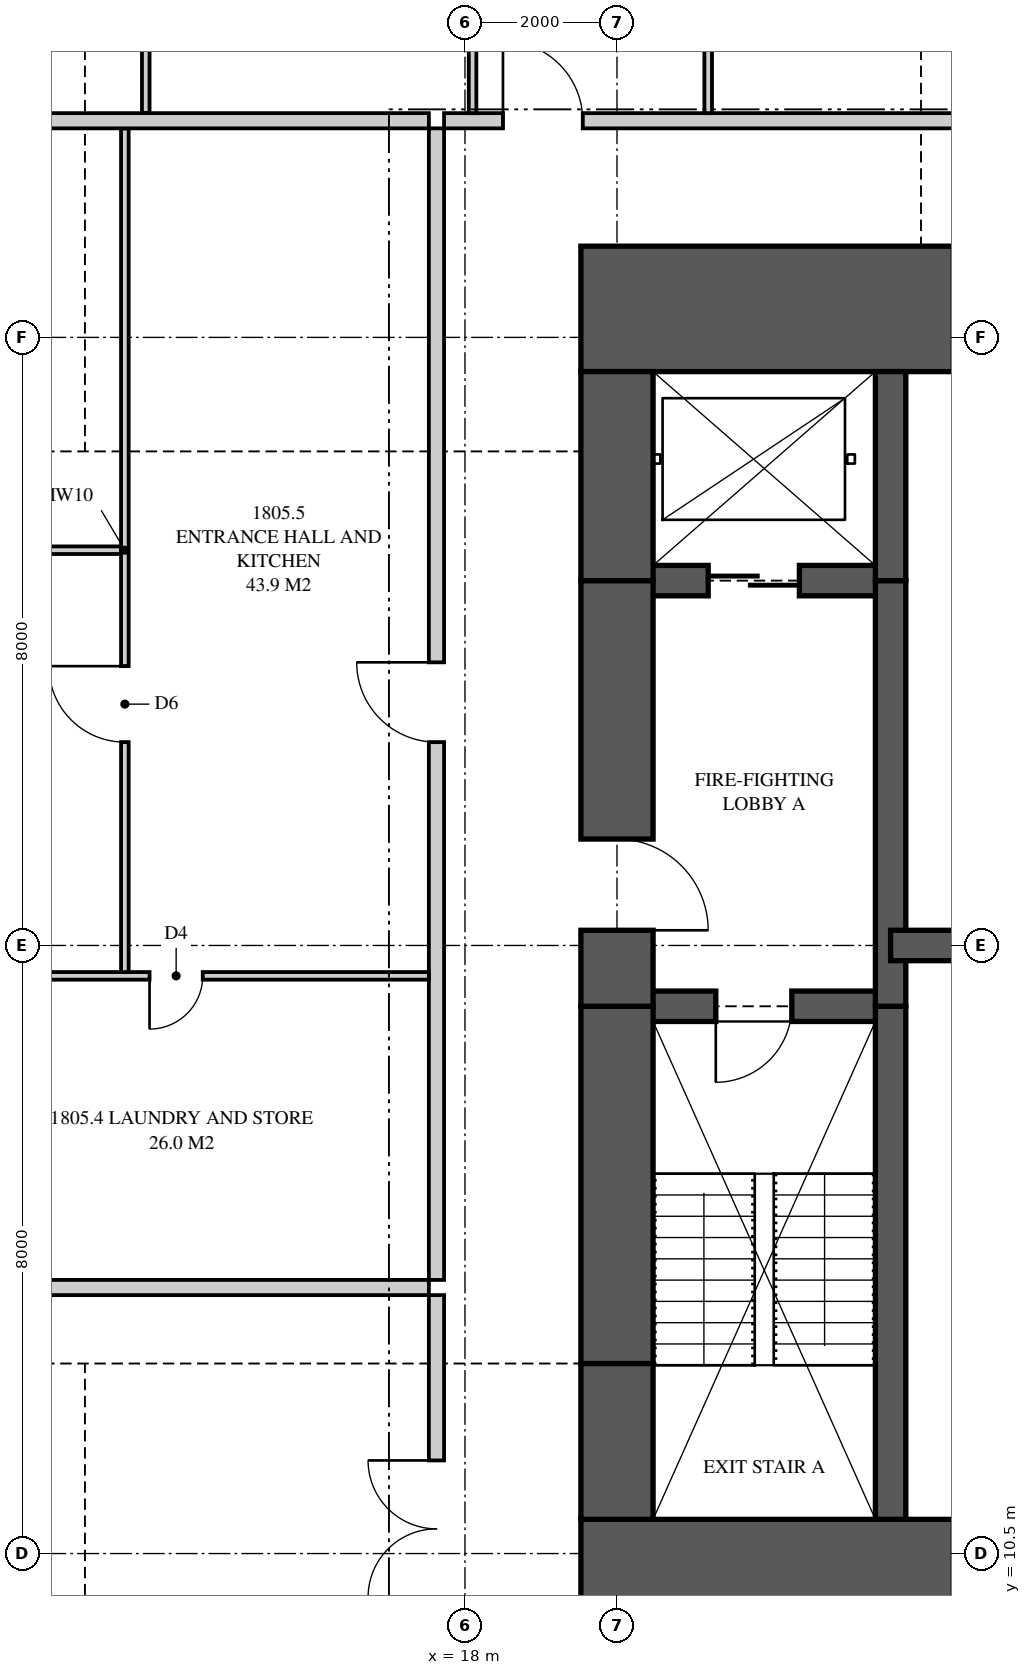
"""IFC4 building model, lengths in metres.
Left out: names, types, materials, properties, quantities, classifications, styles, units other than length and angle.
Written with IfcOpenShell. Run it as: python <this file> out.ifc"""

import sys

from ifc_helpers import new_model, si_unit, direction, frame, frame_2d, origin, place, context, subcontext, project, spatial, polyline, rectangle, outline, extrude, element, fill, save


model = new_model("IFC4")
c1 = context("Model", 3, precision=1e-05, world=origin(), true_north=direction((0.0, 1.0)))
c2 = subcontext(c1, "Body", "Model", "MODEL_VIEW")
j1 = project(units=[si_unit("LENGTHUNIT", "METRE"), si_unit("PLANEANGLEUNIT", "RADIAN")], contexts=[c1])
p1 = place(None, origin())
s1 = spatial("IfcSite", under=j1, at=p1, CompositionType="ELEMENT")
p2 = place(p1, origin())
s2 = spatial("IfcBuilding", under=s1, at=p2, CompositionType="ELEMENT")
p3 = place(p2, frame((0.0, 0.0, 67.9)))
s3 = spatial("IfcBuildingStorey", under=s2, at=p3, CompositionType="ELEMENT", Elevation=67.9)
p4 = place(p3, frame((19.525, 10.125, 0.0), z_axis=(0.0, 0.0, 1.0), x_axis=(1.0, 0.0, 0.0)))
e1 = element("IfcWall", 1, at=p4, inside=s3, PredefinedType="SHEAR", context=c2, shape_type="SweptSolid", body=[
    extrude(rectangle(XDim=6.475, YDim=1.65, at=frame_2d((3.238, 0.0))), origin(), (0.0, 0.0, 1.0), 3.35),
])
p5 = place(p4, frame((4.9, 0.0, 0.0)))
e2 = element("IfcOpeningElement", 2, at=p5, cuts=e1, PredefinedType="OPENING", context=c2, shape_type="SweptSolid", body=[
    extrude(rectangle(XDim=0.75, YDim=2.1, at=frame_2d((0.375, 1.05))), frame((0.0, 0.835, 0.0), z_axis=(0.0, -1.0, 0.0), x_axis=(1.0, 0.0, 0.0)), (0.0, 0.0, 1.0), 1.67),
])
p6 = place(p3, frame((26.0, 26.875, 0.0), z_axis=(0.0, 0.0, 1.0), x_axis=(-1.0, 0.0, 0.0)))
e3 = element("IfcWall", 3, at=p6, inside=s3, PredefinedType="SHEAR", context=c2, shape_type="SweptSolid", body=[
    extrude(rectangle(XDim=6.475, YDim=1.65, at=frame_2d((3.238, 0.0))), origin(), (0.0, 0.0, 1.0), 3.35),
])
p7 = place(p6, frame((0.825, 0.0, 0.0)))
e4 = element("IfcOpeningElement", 4, at=p7, cuts=e3, PredefinedType="OPENING", context=c2, shape_type="SweptSolid", body=[
    extrude(rectangle(XDim=0.75, YDim=2.1, at=frame_2d((0.375, 1.05))), frame((0.0, 0.835, 0.0), z_axis=(0.0, -1.0, 0.0), x_axis=(1.0, 0.0, 0.0)), (0.0, 0.0, 1.0), 1.67),
])
p8 = place(p3, frame((20.0, 26.05, 0.0), z_axis=(0.0, 0.0, 1.0), x_axis=(0.0, -1.0, 0.0)))
e5 = element("IfcWall", 5, at=p8, inside=s3, PredefinedType="SHEAR", context=c2, shape_type="SweptSolid", body=[
    extrude(rectangle(XDim=2.75, YDim=0.95, at=frame_2d((1.375, 0.0))), origin(), (0.0, 0.0, 1.0), 3.35),
])
p9 = place(p3, frame((20.0, 23.3, 0.0), z_axis=(0.0, 0.0, 1.0), x_axis=(0.0, -1.0, 0.0)))
e6 = element("IfcWall", 6, at=p9, inside=s3, PredefinedType="SHEAR", context=c2, shape_type="SweptSolid", body=[
    extrude(rectangle(XDim=5.6, YDim=0.95, at=frame_2d((2.8, 0.0))), origin(), (0.0, 0.0, 1.0), 3.35),
])
p10 = place(p9, frame((3.4, 0.0, 0.0)))
e7 = element("IfcOpeningElement", 7, at=p10, cuts=e6, PredefinedType="OPENING", context=c2, shape_type="SweptSolid", body=[
    extrude(rectangle(XDim=1.2, YDim=2.2, at=frame_2d((0.6, 1.1))), frame((0.0, 0.485, 0.0), z_axis=(0.0, -1.0, 0.0), x_axis=(1.0, 0.0, 0.0)), (0.0, 0.0, 1.0), 0.97),
])
p11 = place(p3, frame((20.0, 17.7, 0.0), z_axis=(0.0, 0.0, 1.0), x_axis=(0.0, -1.0, 0.0)))
e8 = element("IfcWall", 8, at=p11, inside=s3, PredefinedType="SHEAR", context=c2, shape_type="SweptSolid", body=[
    extrude(rectangle(XDim=4.7, YDim=0.95, at=frame_2d((2.35, 0.0))), origin(), (0.0, 0.0, 1.0), 3.35),
])
p12 = place(p3, frame((20.0, 13.0, 0.0), z_axis=(0.0, 0.0, 1.0), x_axis=(0.0, -1.0, 0.0)))
e9 = element("IfcWall", 9, at=p12, inside=s3, PredefinedType="SHEAR", context=c2, shape_type="SweptSolid", body=[
    extrude(rectangle(XDim=2.05, YDim=0.95, at=frame_2d((1.025, 0.0))), origin(), (0.0, 0.0, 1.0), 3.35),
])
p13 = place(p3, frame((23.6, 10.95, 0.0), z_axis=(0.0, 0.0, 1.0), x_axis=(0.0, 1.0, 0.0)))
e10 = element("IfcWall", 10, at=p13, inside=s3, PredefinedType="SHEAR", context=c2, shape_type="SweptSolid", body=[
    extrude(rectangle(XDim=6.75, YDim=0.4, at=frame_2d((3.375, 0.0))), origin(), (0.0, 0.0, 1.0), 3.35),
])
p14 = place(p3, frame((23.6, 17.7, 0.0), z_axis=(0.0, 0.0, 1.0), x_axis=(0.0, 1.0, 0.0)))
e11 = element("IfcWall", 11, at=p14, inside=s3, PredefinedType="SHEAR", context=c2, shape_type="SweptSolid", body=[
    extrude(rectangle(XDim=5.6, YDim=0.4, at=frame_2d((2.8, 0.0))), origin(), (0.0, 0.0, 1.0), 3.35),
])
p15 = place(p3, frame((23.6, 23.3, 0.0), z_axis=(0.0, 0.0, 1.0), x_axis=(0.0, 1.0, 0.0)))
e12 = element("IfcWall", 12, at=p15, inside=s3, PredefinedType="SHEAR", context=c2, shape_type="SweptSolid", body=[
    extrude(rectangle(XDim=2.75, YDim=0.4, at=frame_2d((1.375, 0.0))), origin(), (0.0, 0.0, 1.0), 3.35),
])
p16 = place(p3, frame((20.0, 17.7, 0.0), z_axis=(0.0, 0.0, 1.0), x_axis=(1.0, 0.0, 0.0)))
e13 = element("IfcWall", 13, at=p16, inside=s3, PredefinedType="SHEAR", context=c2, shape_type="SweptSolid", body=[
    extrude(rectangle(XDim=3.6, YDim=0.4, at=frame_2d((1.8, 0.0))), origin(), (0.0, 0.0, 1.0), 3.35),
])
p17 = place(p16, frame((1.3, 0.0, 0.0)))
e14 = element("IfcOpeningElement", 14, at=p17, cuts=e13, PredefinedType="OPENING", context=c2, shape_type="SweptSolid", body=[
    extrude(rectangle(XDim=1.0, YDim=2.1, at=frame_2d((0.5, 1.05))), frame((0.0, 0.21, 0.0), z_axis=(0.0, -1.0, 0.0), x_axis=(1.0, 0.0, 0.0)), (0.0, 0.0, 1.0), 0.42),
])
p18 = place(p3, frame((20.0, 23.3, 0.0), z_axis=(0.0, 0.0, 1.0), x_axis=(1.0, 0.0, 0.0)))
e15 = element("IfcWall", 15, at=p18, inside=s3, PredefinedType="SHEAR", context=c2, shape_type="SweptSolid", body=[
    extrude(rectangle(XDim=3.6, YDim=0.4, at=frame_2d((1.8, 0.0))), origin(), (0.0, 0.0, 1.0), 3.35),
])
p19 = place(p18, frame((1.2, 0.0, 0.0)))
e16 = element("IfcOpeningElement", 16, at=p19, cuts=e15, PredefinedType="OPENING", context=c2, shape_type="SweptSolid", body=[
    extrude(rectangle(XDim=1.2, YDim=2.1, at=frame_2d((0.6, 1.05))), frame((0.0, 0.21, 0.0), z_axis=(0.0, -1.0, 0.0), x_axis=(1.0, 0.0, 0.0)), (0.0, 0.0, 1.0), 0.42),
])
p20 = place(p3, frame((23.6, 18.5, 0.0), z_axis=(0.0, 0.0, 1.0), x_axis=(1.0, 0.0, 0.0)))
e17 = element("IfcWall", 17, at=p20, inside=s3, PredefinedType="SHEAR", context=c2, shape_type="SweptSolid", body=[
    extrude(rectangle(XDim=2.4, YDim=0.4, at=frame_2d((1.2, 0.0))), origin(), (0.0, 0.0, 1.0), 3.35),
])
p21 = place(p3, frame((17.725, 29.35, 0.0), z_axis=(0.0, 0.0, 1.0), x_axis=(1.0, 0.0, 0.0)))
e18 = element("IfcWall", 18, at=p21, inside=s3, PredefinedType="PARTITIONING", context=c2, shape_type="SweptSolid", body=[
    extrude(outline(polyline([(0.0, 0.0), (7.075, 0.0), (7.075, 3.11), (6.612, 3.11), (6.612, 2.541), (5.938, 2.541), (5.938, 3.11), (0.0, 3.11), (0.0, 0.0)])), frame((0.0, 0.1, 0.0), z_axis=(0.0, -1.0, 0.0), x_axis=(1.0, 0.0, 0.0)), (0.0, 0.0, 1.0), 0.2),
])
p22 = place(p21, frame((0.775, 0.0, 0.0)))
e19 = element("IfcOpeningElement", 19, at=p22, cuts=e18, PredefinedType="OPENING", context=c2, shape_type="SweptSolid", body=[
    extrude(rectangle(XDim=1.05, YDim=2.2, at=frame_2d((0.525, 1.1))), frame((0.0, 0.11, 0.0), z_axis=(0.0, -1.0, 0.0), x_axis=(1.0, 0.0, 0.0)), (0.0, 0.0, 1.0), 0.22),
])
p23 = place(p3, frame((13.8, 37.825, 0.0), z_axis=(0.0, 0.0, 1.0), x_axis=(0.0, -1.0, 0.0)))
e20 = element("IfcWall", 20, at=p23, inside=s3, PredefinedType="PARTITIONING", context=c2, shape_type="SweptSolid", body=[
    extrude(outline(polyline([(2.035, 2.15), (0.0, 2.15), (0.0, 0.0), (8.375, 0.0), (8.375, 3.11), (2.035, 3.11), (2.035, 2.15)]), holes=[polyline([(1.021, 0.133), (0.529, 0.133), (0.529, 0.923), (1.021, 0.923), (1.021, 0.133)]), polyline([(1.021, 1.227), (0.529, 1.227), (0.529, 2.017), (1.021, 2.017), (1.021, 1.227)])]), frame((0.0, 0.05, 0.0), z_axis=(0.0, -1.0, 0.0), x_axis=(1.0, 0.0, 0.0)), (0.0, 0.0, 1.0), 0.1),
])
p24 = place(p23, frame((4.525, 0.0, 0.0)))
e21 = element("IfcOpeningElement", 21, at=p24, cuts=e20, PredefinedType="OPENING", context=c2, shape_type="SweptSolid", body=[
    extrude(rectangle(XDim=0.9, YDim=2.1, at=frame_2d((0.45, 1.05))), frame((0.0, 0.06, 0.0), z_axis=(0.0, -1.0, 0.0), x_axis=(1.0, 0.0, 0.0)), (0.0, 0.0, 1.0), 0.12),
])
p25 = place(p3, frame((18.1, 37.825, 0.0), z_axis=(0.0, 0.0, 1.0), x_axis=(0.0, -1.0, 0.0)))
e22 = element("IfcWall", 22, at=p25, inside=s3, PredefinedType="PARTITIONING", context=c2, shape_type="SweptSolid", body=[
    extrude(outline(polyline([(0.0, 0.0), (8.375, 0.0), (8.375, 3.11), (2.035, 3.11), (2.035, 2.15), (0.0, 2.15), (0.0, 3.11), (0.0, 0.0)])), frame((0.0, 0.05, 0.0), z_axis=(0.0, -1.0, 0.0), x_axis=(1.0, 0.0, 0.0)), (0.0, 0.0, 1.0), 0.1),
])
p26 = place(p25, frame((4.525, 0.0, 0.0)))
e23 = element("IfcOpeningElement", 23, at=p26, cuts=e22, PredefinedType="OPENING", context=c2, shape_type="SweptSolid", body=[
    extrude(rectangle(XDim=0.9, YDim=2.1, at=frame_2d((0.45, 1.05))), frame((0.0, 0.06, 0.0), z_axis=(0.0, -1.0, 0.0), x_axis=(1.0, 0.0, 0.0)), (0.0, 0.0, 1.0), 0.12),
])
p27 = place(p25, frame((5.95, 0.0, 0.0)))
e24 = element("IfcOpeningElement", 24, at=p27, cuts=e22, PredefinedType="OPENING", context=c2, shape_type="SweptSolid", body=[
    extrude(rectangle(XDim=0.9, YDim=2.1, at=frame_2d((0.45, 1.05))), frame((0.0, 0.06, 0.0), z_axis=(0.0, -1.0, 0.0), x_axis=(1.0, 0.0, 0.0)), (0.0, 0.0, 1.0), 0.12),
])
p28 = place(p3, frame((21.2, 32.4, 0.0), z_axis=(0.0, 0.0, 1.0), x_axis=(0.0, -1.0, 0.0)))
e25 = element("IfcWall", 25, at=p28, inside=s3, PredefinedType="PARTITIONING", context=c2, shape_type="SweptSolid", body=[
    extrude(rectangle(XDim=2.95, YDim=0.1, at=frame_2d((1.475, 0.0))), origin(), (0.0, 0.0, 1.0), 3.11),
])
p29 = place(p3, frame((2.0, 29.35, 0.0), z_axis=(0.0, 0.0, 1.0), x_axis=(1.0, 0.0, 0.0)))
e26 = element("IfcWall", 26, at=p29, inside=s3, PredefinedType="PARTITIONING", context=c2, shape_type="SweptSolid", body=[
    extrude(outline(polyline([(0.0, 0.0), (15.525, 0.0), (15.525, 3.11), (11.337, 3.11), (11.337, 2.541), (10.663, 2.541), (10.663, 3.11), (9.51, 3.11), (9.51, 2.51), (6.89, 2.51), (6.89, 3.11), (2.982, 3.11), (2.982, 2.15), (0.328, 2.15), (0.328, 3.11), (0.0, 3.11), (0.0, 0.0)])), frame((0.0, 0.1, 0.0), z_axis=(0.0, -1.0, 0.0), x_axis=(1.0, 0.0, 0.0)), (0.0, 0.0, 1.0), 0.2),
])
p30 = place(p3, frame((2.175, 14.0, 0.0), z_axis=(0.0, 0.0, 1.0), x_axis=(1.0, 0.0, 0.0)))
e27 = element("IfcWall", 27, at=p30, inside=s3, PredefinedType="PARTITIONING", context=c2, shape_type="SweptSolid", body=[
    extrude(outline(polyline([(0.529, 2.15), (0.0, 2.15), (0.0, 0.0), (0.529, 0.0), (0.529, 0.821), (1.021, 0.821), (1.021, 0.0), (15.35, 0.0), (15.35, 3.11), (9.335, 3.11), (9.335, 2.51), (6.715, 2.51), (6.715, 3.11), (2.085, 3.11), (2.085, 2.15), (1.021, 2.15), (1.021, 1.33), (0.529, 1.33), (0.529, 2.15)])), frame((0.0, 0.1, 0.0), z_axis=(0.0, -1.0, 0.0), x_axis=(1.0, 0.0, 0.0)), (0.0, 0.0, 1.0), 0.2),
])
p31 = place(p3, frame((17.625, 7.75, 0.0), z_axis=(0.0, 0.0, 1.0), x_axis=(0.0, 1.0, 0.0)))
e28 = element("IfcWall", 28, at=p31, inside=s3, PredefinedType="PARTITIONING", context=c2, shape_type="SweptSolid", body=[
    extrude(outline(polyline([(0.0, 0.0), (6.15, 0.0), (6.15, 3.11), (5.587, 3.11), (5.587, 2.541), (4.913, 2.541), (4.913, 3.11), (0.0, 3.11), (0.0, 0.0)])), frame((0.0, 0.1, 0.0), z_axis=(0.0, -1.0, 0.0), x_axis=(1.0, 0.0, 0.0)), (0.0, 0.0, 1.0), 0.2),
])
p32 = place(p31, frame((2.175, 0.0, 0.0)))
e29 = element("IfcOpeningElement", 29, at=p32, cuts=e28, PredefinedType="OPENING", context=c2, shape_type="SweptSolid", body=[
    extrude(rectangle(XDim=1.8, YDim=2.1, at=frame_2d((0.9, 1.05))), frame((0.0, 0.11, 0.0), z_axis=(0.0, -1.0, 0.0), x_axis=(1.0, 0.0, 0.0)), (0.0, 0.0, 1.0), 0.22),
])
p33 = place(p3, frame((17.625, 14.1, 0.0), z_axis=(0.0, 0.0, 1.0), x_axis=(0.0, 1.0, 0.0)))
e30 = element("IfcWall", 30, at=p33, inside=s3, PredefinedType="PARTITIONING", context=c2, shape_type="SweptSolid", body=[
    extrude(outline(polyline([(0.0, 0.0), (15.15, 0.0), (15.15, 3.11), (11.237, 3.11), (11.237, 2.541), (10.562, 2.541), (10.562, 3.11), (0.0, 3.11), (0.0, 0.0)])), frame((0.0, 0.1, 0.0), z_axis=(0.0, -1.0, 0.0), x_axis=(1.0, 0.0, 0.0)), (0.0, 0.0, 1.0), 0.2),
])
p34 = place(p33, frame((7.075, 0.0, 0.0)))
e31 = element("IfcOpeningElement", 31, at=p34, cuts=e30, PredefinedType="OPENING", context=c2, shape_type="SweptSolid", body=[
    extrude(rectangle(XDim=1.05, YDim=2.2, at=frame_2d((0.525, 1.1))), frame((0.0, 0.11, 0.0), z_axis=(0.0, -1.0, 0.0), x_axis=(1.0, 0.0, 0.0)), (0.0, 0.0, 1.0), 0.22),
])
p35 = place(p3, frame((2.175, 18.1, 0.0), z_axis=(0.0, 0.0, 1.0), x_axis=(1.0, 0.0, 0.0)))
e32 = element("IfcWall", 32, at=p35, inside=s3, PredefinedType="PARTITIONING", context=c2, shape_type="SweptSolid", body=[
    extrude(outline(polyline([(0.0, 0.0), (15.35, 0.0), (15.35, 3.11), (9.285, 3.11), (9.285, 2.51), (6.765, 2.51), (6.765, 3.11), (2.035, 3.11), (2.035, 2.15), (0.0, 2.15), (0.0, 3.11), (0.0, 0.0)])), frame((0.0, 0.05, 0.0), z_axis=(0.0, -1.0, 0.0), x_axis=(1.0, 0.0, 0.0)), (0.0, 0.0, 1.0), 0.1),
])
p36 = place(p35, frame((4.85, 0.0, 0.0)))
e33 = element("IfcOpeningElement", 33, at=p36, cuts=e32, PredefinedType="OPENING", context=c2, shape_type="SweptSolid", body=[
    extrude(rectangle(XDim=0.9, YDim=2.1, at=frame_2d((0.45, 1.05))), frame((0.0, 0.06, 0.0), z_axis=(0.0, -1.0, 0.0), x_axis=(1.0, 0.0, 0.0)), (0.0, 0.0, 1.0), 0.12),
])
p37 = place(p35, frame((11.675, 0.0, 0.0)))
e34 = element("IfcOpeningElement", 34, at=p37, cuts=e32, PredefinedType="OPENING", context=c2, shape_type="SweptSolid", body=[
    extrude(rectangle(XDim=0.7, YDim=2.1, at=frame_2d((0.35, 1.05))), frame((0.0, 0.06, 0.0), z_axis=(0.0, -1.0, 0.0), x_axis=(1.0, 0.0, 0.0)), (0.0, 0.0, 1.0), 0.12),
])
p38 = place(p3, frame((13.525, 18.15, 0.0), z_axis=(0.0, 0.0, 1.0), x_axis=(0.0, 1.0, 0.0)))
e35 = element("IfcWall", 35, at=p38, inside=s3, PredefinedType="PARTITIONING", context=c2, shape_type="SweptSolid", body=[
    extrude(outline(polyline([(0.0, 0.0), (11.1, 0.0), (11.1, 3.11), (7.137, 3.11), (7.137, 2.541), (6.563, 2.541), (6.563, 3.11), (0.0, 3.11), (0.0, 0.0)])), frame((0.0, 0.05, 0.0), z_axis=(0.0, -1.0, 0.0), x_axis=(1.0, 0.0, 0.0)), (0.0, 0.0, 1.0), 0.1),
])
p39 = place(p38, frame((3.025, 0.0, 0.0)))
e36 = element("IfcOpeningElement", 36, at=p39, cuts=e35, PredefinedType="OPENING", context=c2, shape_type="SweptSolid", body=[
    extrude(rectangle(XDim=1.0, YDim=2.1, at=frame_2d((0.5, 1.05))), frame((0.0, 0.06, 0.0), z_axis=(0.0, -1.0, 0.0), x_axis=(1.0, 0.0, 0.0)), (0.0, 0.0, 1.0), 0.12),
])
p40 = place(p3, frame((2.175, 23.7, 0.0), z_axis=(0.0, 0.0, 1.0), x_axis=(1.0, 0.0, 0.0)))
e37 = element("IfcWall", 37, at=p40, inside=s3, PredefinedType="PARTITIONING", context=c2, shape_type="SweptSolid", body=[
    extrude(outline(polyline([(0.529, 2.15), (0.0, 2.15), (0.0, 0.0), (0.529, 0.0), (0.529, 0.581), (1.021, 0.581), (1.021, 0.0), (11.3, 0.0), (11.3, 3.11), (9.285, 3.11), (9.285, 2.51), (6.765, 2.51), (6.765, 3.11), (2.035, 3.11), (2.035, 2.15), (1.021, 2.15), (1.021, 1.569), (0.529, 1.569), (0.529, 2.15)])), frame((0.0, 0.05, 0.0), z_axis=(0.0, -1.0, 0.0), x_axis=(1.0, 0.0, 0.0)), (0.0, 0.0, 1.0), 0.1),
])
p41 = place(p40, frame((5.15, 0.0, 0.0)))
e38 = element("IfcOpeningElement", 38, at=p41, cuts=e37, PredefinedType="OPENING", context=c2, shape_type="SweptSolid", body=[
    extrude(rectangle(XDim=1.0, YDim=2.1, at=frame_2d((0.5, 1.05))), frame((0.0, 0.06, 0.0), z_axis=(0.0, -1.0, 0.0), x_axis=(1.0, 0.0, 0.0)), (0.0, 0.0, 1.0), 0.12),
])
p42 = place(p22, origin())
e39 = element("IfcDoor", 39, at=p42, inside=s3, OperationType="SINGLE_SWING_LEFT", PredefinedType="DOOR", context=c2, shape_type="SweptSolid", body=[
    extrude(rectangle(XDim=1.05, YDim=2.2, at=frame_2d((0.525, 1.1))), frame((0.0, 0.025, 0.0), z_axis=(0.0, -1.0, 0.0), x_axis=(1.0, 0.0, 0.0)), (0.0, 0.0, 1.0), 0.05),
])
fill(e19, e39)
p43 = place(p32, origin())
e40 = element("IfcDoor", 40, at=p43, inside=s3, OperationType="DOUBLE_DOOR_SINGLE_SWING", PredefinedType="DOOR", context=c2, shape_type="SweptSolid", body=[
    extrude(rectangle(XDim=1.8, YDim=2.1, at=frame_2d((0.9, 1.05))), frame((0.0, 0.025, 0.0), z_axis=(0.0, -1.0, 0.0), x_axis=(1.0, 0.0, 0.0)), (0.0, 0.0, 1.0), 0.05),
])
fill(e29, e40)
p44 = place(p34, origin())
e41 = element("IfcDoor", 41, at=p44, inside=s3, OperationType="SINGLE_SWING_RIGHT", PredefinedType="DOOR", context=c2, shape_type="SweptSolid", body=[
    extrude(rectangle(XDim=1.05, YDim=2.2, at=frame_2d((0.525, 1.1))), frame((0.0, 0.025, 0.0), z_axis=(0.0, -1.0, 0.0), x_axis=(1.0, 0.0, 0.0)), (0.0, 0.0, 1.0), 0.05),
])
fill(e31, e41)
p45 = place(p37, frame((0.7, 0.0, 0.0), z_axis=(0.0, 0.0, 1.0), x_axis=(-1.0, 0.0, 0.0)))
e42 = element("IfcDoor", 42, at=p45, inside=s3, OperationType="SINGLE_SWING_RIGHT", PredefinedType="DOOR", context=c2, shape_type="SweptSolid", body=[
    extrude(rectangle(XDim=0.7, YDim=2.1, at=frame_2d((0.35, 1.05))), frame((0.0, 0.025, 0.0), z_axis=(0.0, -1.0, 0.0), x_axis=(1.0, 0.0, 0.0)), (0.0, 0.0, 1.0), 0.05),
])
fill(e34, e42)
p46 = place(p39, origin())
e43 = element("IfcDoor", 43, at=p46, inside=s3, OperationType="SINGLE_SWING_RIGHT", PredefinedType="DOOR", context=c2, shape_type="SweptSolid", body=[
    extrude(rectangle(XDim=1.0, YDim=2.1, at=frame_2d((0.5, 1.05))), frame((0.0, 0.025, 0.0), z_axis=(0.0, -1.0, 0.0), x_axis=(1.0, 0.0, 0.0)), (0.0, 0.0, 1.0), 0.05),
])
fill(e36, e43)
p47 = place(p17, frame((1.0, 0.0, 0.0), z_axis=(0.0, 0.0, 1.0), x_axis=(-1.0, 0.0, 0.0)))
e44 = element("IfcDoor", 44, at=p47, inside=s3, OperationType="SINGLE_SWING_RIGHT", PredefinedType="DOOR", context=c2, shape_type="SweptSolid", body=[
    extrude(rectangle(XDim=1.0, YDim=2.1, at=frame_2d((0.5, 1.05))), frame((0.0, 0.025, 0.0), z_axis=(0.0, -1.0, 0.0), x_axis=(1.0, 0.0, 0.0)), (0.0, 0.0, 1.0), 0.05),
])
fill(e14, e44)
p48 = place(p10, origin())
e45 = element("IfcDoor", 45, at=p48, inside=s3, OperationType="SINGLE_SWING_RIGHT", PredefinedType="DOOR", context=c2, shape_type="SweptSolid", body=[
    extrude(rectangle(XDim=1.2, YDim=2.2, at=frame_2d((0.6, 1.1))), frame((0.0, 0.025, 0.0), z_axis=(0.0, -1.0, 0.0), x_axis=(1.0, 0.0, 0.0)), (0.0, 0.0, 1.0), 0.05),
])
fill(e7, e45)
p49 = place(p19, origin())
e46 = element("IfcDoor", 46, at=p49, inside=s3, OperationType="SLIDING_TO_LEFT", PredefinedType="DOOR", context=c2, shape_type="SweptSolid", body=[
    extrude(rectangle(XDim=1.2, YDim=2.1, at=frame_2d((0.6, 1.05))), frame((0.0, 0.025, 0.0), z_axis=(0.0, -1.0, 0.0), x_axis=(1.0, 0.0, 0.0)), (0.0, 0.0, 1.0), 0.05),
])
fill(e16, e46)
save(model, sys.argv[1])
